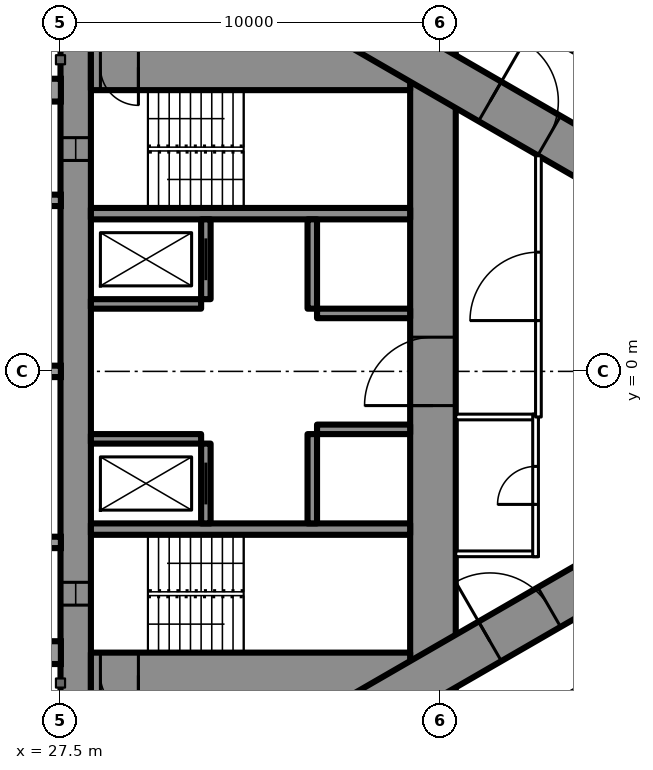
"""IFC4 building model, lengths in metres.
Left out: names, types, materials, properties, quantities, classifications, styles, units other than length and angle.
Written with IfcOpenShell. Run it as: python <this file> out.ifc"""

import sys

from ifc_helpers import new_model, si_unit, direction, frame, frame_2d, origin, place, context, subcontext, project, spatial, rectangle, extrude, element, fill, save


model = new_model("IFC4")
c1 = context("Model", 3, precision=1e-05, world=origin(), true_north=direction((0.0, 1.0)))
c2 = subcontext(c1, "Body", "Model", "MODEL_VIEW")
j1 = project(units=[si_unit("LENGTHUNIT", "METRE"), si_unit("PLANEANGLEUNIT", "RADIAN")], contexts=[c1])
p1 = place(None, origin())
s1 = spatial("IfcSite", under=j1, at=p1, CompositionType="ELEMENT")
p2 = place(p1, origin())
s2 = spatial("IfcBuilding", under=s1, at=p2, CompositionType="ELEMENT")
p3 = place(p2, frame((0.0, 0.0, 42.5)))
s3 = spatial("IfcBuildingStorey", under=s2, at=p3, CompositionType="ELEMENT", Elevation=42.5)
p4 = place(p3, frame((27.9, -8.6, 0.0), z_axis=(0.0, 0.0, 1.0), x_axis=(0.0, 1.0, 0.0)))
e1 = element("IfcWall", 1, at=p4, inside=s3, PredefinedType="SHEAR", context=c2, shape_type="SweptSolid", body=[
    extrude(rectangle(XDim=17.2, YDim=0.8, at=frame_2d((8.6, 0.0))), origin(), (0.0, 0.0, 1.0), 3.5),
])
p5 = place(p4, frame((2.45, 0.0, 0.6)))
e2 = element("IfcOpeningElement", 2, at=p5, cuts=e1, PredefinedType="OPENING", context=c2, shape_type="SweptSolid", body=[
    extrude(rectangle(XDim=0.6, YDim=2.1, at=frame_2d((0.3, 1.05))), frame((0.0, 0.41, 0.0), z_axis=(0.0, -1.0, 0.0), x_axis=(1.0, 0.0, 0.0)), (0.0, 0.0, 1.0), 0.82),
])
p6 = place(p4, frame((14.15, 0.0, 0.6)))
e3 = element("IfcOpeningElement", 3, at=p6, cuts=e1, PredefinedType="OPENING", context=c2, shape_type="SweptSolid", body=[
    extrude(rectangle(XDim=0.6, YDim=2.1, at=frame_2d((0.3, 1.05))), frame((0.0, 0.41, 0.0), z_axis=(0.0, -1.0, 0.0), x_axis=(1.0, 0.0, 0.0)), (0.0, 0.0, 1.0), 0.82),
])
p7 = place(p3, frame((37.3, -8.6, 0.0), z_axis=(0.0, 0.0, 1.0), x_axis=(0.0, 1.0, 0.0)))
e4 = element("IfcWall", 4, at=p7, inside=s3, PredefinedType="SHEAR", context=c2, shape_type="SweptSolid", body=[
    extrude(rectangle(XDim=17.2, YDim=1.2, at=frame_2d((8.6, 0.0))), origin(), (0.0, 0.0, 1.0), 3.5),
])
p8 = place(p7, frame((7.7, 0.0, 0.0)))
e5 = element("IfcOpeningElement", 5, at=p8, cuts=e4, PredefinedType="OPENING", context=c2, shape_type="SweptSolid", body=[
    extrude(rectangle(XDim=1.8, YDim=2.2, at=frame_2d((0.9, 1.1))), frame((0.0, 0.61, 0.0), z_axis=(0.0, -1.0, 0.0), x_axis=(1.0, 0.0, 0.0)), (0.0, 0.0, 1.0), 1.22),
])
p9 = place(p3, frame((28.3, -8.0, 0.0), z_axis=(0.0, 0.0, 1.0), x_axis=(1.0, 0.0, 0.0)))
e6 = element("IfcWall", 6, at=p9, inside=s3, PredefinedType="SHEAR", context=c2, shape_type="SweptSolid", body=[
    extrude(rectangle(XDim=8.4, YDim=1.2, at=frame_2d((4.2, 0.0))), origin(), (0.0, 0.0, 1.0), 3.5),
])
p10 = place(p9, frame((0.25, 0.0, 0.0)))
e7 = element("IfcOpeningElement", 7, at=p10, cuts=e6, PredefinedType="OPENING", context=c2, shape_type="SweptSolid", body=[
    extrude(rectangle(XDim=1.0, YDim=2.2, at=frame_2d((0.5, 1.1))), frame((0.0, 0.61, 0.0), z_axis=(0.0, -1.0, 0.0), x_axis=(1.0, 0.0, 0.0)), (0.0, 0.0, 1.0), 1.22),
])
p11 = place(p3, frame((28.3, 8.0, 0.0), z_axis=(0.0, 0.0, 1.0), x_axis=(1.0, 0.0, 0.0)))
e8 = element("IfcWall", 8, at=p11, inside=s3, PredefinedType="SHEAR", context=c2, shape_type="SweptSolid", body=[
    extrude(rectangle(XDim=8.4, YDim=1.2, at=frame_2d((4.2, 0.0))), origin(), (0.0, 0.0, 1.0), 3.5),
])
p12 = place(p11, frame((0.25, 0.0, 0.0)))
e9 = element("IfcOpeningElement", 9, at=p12, cuts=e8, PredefinedType="OPENING", context=c2, shape_type="SweptSolid", body=[
    extrude(rectangle(XDim=1.0, YDim=2.2, at=frame_2d((0.5, 1.1))), frame((0.0, 0.61, 0.0), z_axis=(0.0, -1.0, 0.0), x_axis=(1.0, 0.0, 0.0)), (0.0, 0.0, 1.0), 1.22),
])
for number, where, z_axis, x_axis in (
    (10, (28.3, -4.15, 0.0), (0.0, 0.0, 1.0), (1.0, 0.0, 0.0)),
    (11, (28.3, 4.15, 0.0), (0.0, 0.0, 1.0), (1.0, 0.0, 0.0)),
):
    element("IfcWall", number, at=place(p3, frame(where, z_axis=z_axis, x_axis=x_axis)), inside=s3, PredefinedType="SHEAR", context=c2, shape_type="SweptSolid", body=[
        extrude(rectangle(XDim=8.4, YDim=0.3, at=frame_2d((4.2, 0.0))), origin(), (0.0, 0.0, 1.0), 3.5),
    ])
p13 = place(p3, frame((31.325, -4.0, 0.0), z_axis=(0.0, 0.0, 1.0), x_axis=(0.0, 1.0, 0.0)))
e12 = element("IfcWall", 12, at=p13, inside=s3, PredefinedType="SHEAR", context=c2, shape_type="SweptSolid", body=[
    extrude(rectangle(XDim=2.1, YDim=0.25, at=frame_2d((1.05, 0.0))), origin(), (0.0, 0.0, 1.0), 3.5),
])
p14 = place(p13, frame((0.5, 0.0, 0.0)))
e13 = element("IfcOpeningElement", 13, at=p14, cuts=e12, PredefinedType="OPENING", context=c2, shape_type="SweptSolid", body=[
    extrude(rectangle(XDim=1.1, YDim=2.2, at=frame_2d((0.55, 1.1))), frame((0.0, 0.135, 0.0), z_axis=(0.0, -1.0, 0.0), x_axis=(1.0, 0.0, 0.0)), (0.0, 0.0, 1.0), 0.27),
])
p15 = place(p3, frame((34.125, -4.0, 0.0), z_axis=(0.0, 0.0, 1.0), x_axis=(0.0, 1.0, 0.0)))
e14 = element("IfcWall", 14, at=p15, inside=s3, PredefinedType="SHEAR", context=c2, shape_type="SweptSolid", body=[
    extrude(rectangle(XDim=2.35, YDim=0.25, at=frame_2d((1.175, 0.0))), origin(), (0.0, 0.0, 1.0), 3.5),
])
p16 = place(p3, frame((28.3, -1.775, 0.0), z_axis=(0.0, 0.0, 1.0), x_axis=(1.0, 0.0, 0.0)))
e15 = element("IfcWall", 15, at=p16, inside=s3, PredefinedType="SHEAR", context=c2, shape_type="SweptSolid", body=[
    extrude(rectangle(XDim=2.9, YDim=0.25, at=frame_2d((1.45, 0.0))), origin(), (0.0, 0.0, 1.0), 3.5),
])
p17 = place(p3, frame((34.25, -1.525, 0.0), z_axis=(0.0, 0.0, 1.0), x_axis=(1.0, 0.0, 0.0)))
e16 = element("IfcWall", 16, at=p17, inside=s3, PredefinedType="SHEAR", context=c2, shape_type="SweptSolid", body=[
    extrude(rectangle(XDim=2.45, YDim=0.25, at=frame_2d((1.225, 0.0))), origin(), (0.0, 0.0, 1.0), 3.5),
])
p18 = place(p3, frame((31.325, 1.9, 0.0), z_axis=(0.0, 0.0, 1.0), x_axis=(0.0, 1.0, 0.0)))
e17 = element("IfcWall", 17, at=p18, inside=s3, PredefinedType="SHEAR", context=c2, shape_type="SweptSolid", body=[
    extrude(rectangle(XDim=2.1, YDim=0.25, at=frame_2d((1.05, 0.0))), origin(), (0.0, 0.0, 1.0), 3.5),
])
p19 = place(p18, frame((0.5, 0.0, 0.0)))
e18 = element("IfcOpeningElement", 18, at=p19, cuts=e17, PredefinedType="OPENING", context=c2, shape_type="SweptSolid", body=[
    extrude(rectangle(XDim=1.1, YDim=2.2, at=frame_2d((0.55, 1.1))), frame((0.0, 0.135, 0.0), z_axis=(0.0, -1.0, 0.0), x_axis=(1.0, 0.0, 0.0)), (0.0, 0.0, 1.0), 0.27),
])
p20 = place(p3, frame((34.125, 1.65, 0.0), z_axis=(0.0, 0.0, 1.0), x_axis=(0.0, 1.0, 0.0)))
e19 = element("IfcWall", 19, at=p20, inside=s3, PredefinedType="SHEAR", context=c2, shape_type="SweptSolid", body=[
    extrude(rectangle(XDim=2.35, YDim=0.25, at=frame_2d((1.175, 0.0))), origin(), (0.0, 0.0, 1.0), 3.5),
])
p21 = place(p3, frame((28.3, 1.775, 0.0), z_axis=(0.0, 0.0, 1.0), x_axis=(1.0, 0.0, 0.0)))
e20 = element("IfcWall", 20, at=p21, inside=s3, PredefinedType="SHEAR", context=c2, shape_type="SweptSolid", body=[
    extrude(rectangle(XDim=2.9, YDim=0.25, at=frame_2d((1.45, 0.0))), origin(), (0.0, 0.0, 1.0), 3.5),
])
p22 = place(p3, frame((34.25, 1.525, 0.0), z_axis=(0.0, 0.0, 1.0), x_axis=(1.0, 0.0, 0.0)))
e21 = element("IfcWall", 21, at=p22, inside=s3, PredefinedType="SHEAR", context=c2, shape_type="SweptSolid", body=[
    extrude(rectangle(XDim=2.45, YDim=0.25, at=frame_2d((1.225, 0.0))), origin(), (0.0, 0.0, 1.0), 3.5),
])
p23 = place(p3, frame((27.2, -13.8, 0.0), z_axis=(0.0, 0.0, 1.0), x_axis=(0.866027159892, 0.499996958321, 0.0)))
e22 = element("IfcWall", 22, at=p23, inside=s3, PredefinedType="SHEAR", context=c2, shape_type="SweptSolid", body=[
    extrude(rectangle(XDim=27.947, YDim=1.2, at=frame_2d((13.973, 0.0))), origin(), (0.0, 0.0, 1.0), 3.5),
])
p24 = place(p23, frame((4.6, 0.0, 0.0)))
e23 = element("IfcOpeningElement", 23, at=p24, cuts=e22, PredefinedType="OPENING", context=c2, shape_type="SweptSolid", body=[
    extrude(rectangle(XDim=1.0, YDim=2.2, at=frame_2d((0.5, 1.1))), frame((0.0, 0.61, 0.0), z_axis=(0.0, -1.0, 0.0), x_axis=(1.0, 0.0, 0.0)), (0.0, 0.0, 1.0), 1.22),
])
p25 = place(p23, frame((13.395, 0.0, 0.0)))
e24 = element("IfcOpeningElement", 24, at=p25, cuts=e22, PredefinedType="OPENING", context=c2, shape_type="SweptSolid", body=[
    extrude(rectangle(XDim=1.8, YDim=2.2, at=frame_2d((0.9, 1.1))), frame((0.0, 0.61, 0.0), z_axis=(0.0, -1.0, 0.0), x_axis=(1.0, 0.0, 0.0)), (0.0, 0.0, 1.0), 1.22),
])
p26 = place(p3, frame((27.2, 13.8, 0.0), z_axis=(0.0, 0.0, 1.0), x_axis=(0.866024515034, -0.500001539357, 0.0)))
e25 = element("IfcWall", 25, at=p26, inside=s3, PredefinedType="SHEAR", context=c2, shape_type="SweptSolid", body=[
    extrude(rectangle(XDim=26.907, YDim=1.2, at=frame_2d((13.454, 0.0))), origin(), (0.0, 0.0, 1.0), 3.5),
])
p27 = place(p26, frame((4.6, 0.0, 0.0)))
e26 = element("IfcOpeningElement", 26, at=p27, cuts=e25, PredefinedType="OPENING", context=c2, shape_type="SweptSolid", body=[
    extrude(rectangle(XDim=1.0, YDim=2.2, at=frame_2d((0.5, 1.1))), frame((0.0, 0.61, 0.0), z_axis=(0.0, -1.0, 0.0), x_axis=(1.0, 0.0, 0.0)), (0.0, 0.0, 1.0), 1.22),
])
p28 = place(p26, frame((13.395, 0.0, 0.0)))
e27 = element("IfcOpeningElement", 27, at=p28, cuts=e25, PredefinedType="OPENING", context=c2, shape_type="SweptSolid", body=[
    extrude(rectangle(XDim=1.8, YDim=2.2, at=frame_2d((0.9, 1.1))), frame((0.0, 0.61, 0.0), z_axis=(0.0, -1.0, 0.0), x_axis=(1.0, 0.0, 0.0)), (0.0, 0.0, 1.0), 1.22),
])
p29 = place(p3, frame((37.96, -10.243, 0.0), z_axis=(0.0, 0.0, 1.0), x_axis=(0.866026429433, 0.499998223521, 0.0)))
e28 = element("IfcWall", 28, at=p29, inside=s3, PredefinedType="PARTITIONING", context=c2, shape_type="SweptSolid", body=[
    extrude(rectangle(XDim=20.487, YDim=0.2, at=frame_2d((10.243, 0.0))), origin(), (0.0, 0.0, 1.0), 3.25),
])
p30 = place(p29, frame((7.325, 0.0, 0.0)))
e29 = element("IfcOpeningElement", 29, at=p30, cuts=e28, PredefinedType="OPENING", context=c2, shape_type="SweptSolid", body=[
    extrude(rectangle(XDim=1.0, YDim=2.2, at=frame_2d((0.5, 1.1))), frame((0.0, 0.11, 0.0), z_axis=(0.0, -1.0, 0.0), x_axis=(1.0, 0.0, 0.0)), (0.0, 0.0, 1.0), 0.22),
])
p31 = place(p29, frame((18.937, 0.0, 0.0)))
e30 = element("IfcOpeningElement", 30, at=p31, cuts=e28, PredefinedType="OPENING", context=c2, shape_type="SweptSolid", body=[
    extrude(rectangle(XDim=0.95, YDim=2.2, at=frame_2d((0.475, 1.1))), frame((0.0, 0.11, 0.0), z_axis=(0.0, -1.0, 0.0), x_axis=(1.0, 0.0, 0.0)), (0.0, 0.0, 1.0), 0.22),
])
p32 = place(p29, frame((0.6, 0.0, 0.0)))
e31 = element("IfcOpeningElement", 31, at=p32, cuts=e28, PredefinedType="OPENING", context=c2, shape_type="SweptSolid", body=[
    extrude(rectangle(XDim=0.95, YDim=2.2, at=frame_2d((0.475, 1.1))), frame((0.0, 0.11, 0.0), z_axis=(0.0, -1.0, 0.0), x_axis=(1.0, 0.0, 0.0)), (0.0, 0.0, 1.0), 0.22),
])
p33 = place(p3, frame((36.834, 10.894, 0.0), z_axis=(0.0, 0.0, 1.0), x_axis=(0.866028157229, -0.499995230863, 0.0)))
e32 = element("IfcWall", 32, at=p33, inside=s3, PredefinedType="PARTITIONING", context=c2, shape_type="SweptSolid", body=[
    extrude(rectangle(XDim=21.667, YDim=0.2, at=frame_2d((10.833, 0.0))), origin(), (0.0, 0.0, 1.0), 3.25),
])
p34 = place(p33, frame((18.885, 0.0, 0.0)))
e33 = element("IfcOpeningElement", 33, at=p34, cuts=e32, PredefinedType="OPENING", context=c2, shape_type="SweptSolid", body=[
    extrude(rectangle(XDim=0.95, YDim=2.2, at=frame_2d((0.475, 1.1))), frame((0.0, 0.11, 0.0), z_axis=(0.0, -1.0, 0.0), x_axis=(1.0, 0.0, 0.0)), (0.0, 0.0, 1.0), 0.22),
])
p35 = place(p33, frame((10.212, 0.0, 0.0)))
e34 = element("IfcOpeningElement", 34, at=p35, cuts=e32, PredefinedType="OPENING", context=c2, shape_type="SweptSolid", body=[
    extrude(rectangle(XDim=0.95, YDim=2.2, at=frame_2d((0.475, 1.1))), frame((0.0, 0.11, 0.0), z_axis=(0.0, -1.0, 0.0), x_axis=(1.0, 0.0, 0.0)), (0.0, 0.0, 1.0), 0.22),
])
p36 = place(p33, frame((8.225, 0.0, 0.0)))
e35 = element("IfcOpeningElement", 35, at=p36, cuts=e32, PredefinedType="OPENING", context=c2, shape_type="SweptSolid", body=[
    extrude(rectangle(XDim=0.95, YDim=2.2, at=frame_2d((0.475, 1.1))), frame((0.0, 0.11, 0.0), z_axis=(0.0, -1.0, 0.0), x_axis=(1.0, 0.0, 0.0)), (0.0, 0.0, 1.0), 0.22),
])
p37 = place(p33, frame((1.825, 0.0, 0.0)))
e36 = element("IfcOpeningElement", 36, at=p37, cuts=e32, PredefinedType="OPENING", context=c2, shape_type="SweptSolid", body=[
    extrude(rectangle(XDim=0.95, YDim=2.2, at=frame_2d((0.475, 1.1))), frame((0.0, 0.11, 0.0), z_axis=(0.0, -1.0, 0.0), x_axis=(1.0, 0.0, 0.0)), (0.0, 0.0, 1.0), 0.22),
])
p38 = place(p33, frame((0.246, 0.0, 0.0)))
e37 = element("IfcOpeningElement", 37, at=p38, cuts=e32, PredefinedType="OPENING", context=c2, shape_type="SweptSolid", body=[
    extrude(rectangle(XDim=0.9, YDim=2.2, at=frame_2d((0.45, 1.1))), frame((0.0, 0.11, 0.0), z_axis=(0.0, -1.0, 0.0), x_axis=(1.0, 0.0, 0.0)), (0.0, 0.0, 1.0), 0.22),
])
for number, where, z_axis, x_axis in (
    (38, (37.9, -1.2, 0.0), (0.0, 0.0, 1.0), (1.0, 0.0, 0.0)),
    (39, (37.9, -4.8, 0.0), (0.0, 0.0, 1.0), (1.0, 0.0, 0.0)),
):
    element("IfcWall", number, at=place(p3, frame(where, z_axis=z_axis, x_axis=x_axis)), inside=s3, PredefinedType="PARTITIONING", context=c2, shape_type="SweptSolid", body=[
        extrude(rectangle(XDim=2.175, YDim=0.15, at=frame_2d((1.087, 0.0))), origin(), (0.0, 0.0, 1.0), 3.25),
    ])
p39 = place(p3, frame((40.0, -4.875, 0.0), z_axis=(0.0, 0.0, 1.0), x_axis=(0.0, 1.0, 0.0)))
e40 = element("IfcWall", 40, at=p39, inside=s3, PredefinedType="PARTITIONING", context=c2, shape_type="SweptSolid", body=[
    extrude(rectangle(XDim=3.75, YDim=0.15, at=frame_2d((1.875, 0.0))), origin(), (0.0, 0.0, 1.0), 3.25),
])
p40 = place(p39, frame((1.375, 0.0, 0.0)))
e41 = element("IfcOpeningElement", 41, at=p40, cuts=e40, PredefinedType="OPENING", context=c2, shape_type="SweptSolid", body=[
    extrude(rectangle(XDim=1.0, YDim=2.2, at=frame_2d((0.5, 1.1))), frame((0.0, 0.085, 0.0), z_axis=(0.0, -1.0, 0.0), x_axis=(1.0, 0.0, 0.0)), (0.0, 0.0, 1.0), 0.17),
])
p41 = place(p3, frame((40.075, -1.2, 0.0), z_axis=(0.0, 0.0, 1.0), x_axis=(0.0, 1.0, 0.0)))
e42 = element("IfcWall", 42, at=p41, inside=s3, PredefinedType="PARTITIONING", context=c2, shape_type="SweptSolid", body=[
    extrude(rectangle(XDim=6.874, YDim=0.15, at=frame_2d((3.437, 0.0))), origin(), (0.0, 0.0, 1.0), 3.25),
])
p42 = place(p41, frame((2.537, 0.0, 0.0)))
e43 = element("IfcOpeningElement", 43, at=p42, cuts=e42, PredefinedType="OPENING", context=c2, shape_type="SweptSolid", body=[
    extrude(rectangle(XDim=1.8, YDim=2.2, at=frame_2d((0.9, 1.1))), frame((0.0, 0.085, 0.0), z_axis=(0.0, -1.0, 0.0), x_axis=(1.0, 0.0, 0.0)), (0.0, 0.0, 1.0), 0.17),
])
p43 = place(p40, origin())
e44 = element("IfcDoor", 44, at=p43, inside=s3, OperationType="SINGLE_SWING_LEFT", PredefinedType="DOOR", context=c2, shape_type="SweptSolid", body=[
    extrude(rectangle(XDim=1.0, YDim=2.2, at=frame_2d((0.5, 1.1))), frame((0.0, 0.025, 0.0), z_axis=(0.0, -1.0, 0.0), x_axis=(1.0, 0.0, 0.0)), (0.0, 0.0, 1.0), 0.05),
])
fill(e41, e44)
p44 = place(p42, origin())
e45 = element("IfcDoor", 45, at=p44, inside=s3, OperationType="DOUBLE_DOOR_SINGLE_SWING", PredefinedType="DOOR", context=c2, shape_type="SweptSolid", body=[
    extrude(rectangle(XDim=1.8, YDim=2.2, at=frame_2d((0.9, 1.1))), frame((0.0, 0.025, 0.0), z_axis=(0.0, -1.0, 0.0), x_axis=(1.0, 0.0, 0.0)), (0.0, 0.0, 1.0), 0.05),
])
fill(e43, e45)
p45 = place(p25, origin())
e46 = element("IfcDoor", 46, at=p45, inside=s3, OperationType="DOUBLE_DOOR_SINGLE_SWING", PredefinedType="DOOR", context=c2, shape_type="SweptSolid", body=[
    extrude(rectangle(XDim=1.8, YDim=2.2, at=frame_2d((0.9, 1.1))), frame((0.0, 0.025, 0.0), z_axis=(0.0, -1.0, 0.0), x_axis=(1.0, 0.0, 0.0)), (0.0, 0.0, 1.0), 0.05),
])
fill(e24, e46)
p46 = place(p28, origin())
e47 = element("IfcDoor", 47, at=p46, inside=s3, OperationType="DOUBLE_DOOR_SINGLE_SWING", PredefinedType="DOOR", context=c2, shape_type="SweptSolid", body=[
    extrude(rectangle(XDim=1.8, YDim=2.2, at=frame_2d((0.9, 1.1))), frame((0.0, 0.025, 0.0), z_axis=(0.0, -1.0, 0.0), x_axis=(1.0, 0.0, 0.0)), (0.0, 0.0, 1.0), 0.05),
])
fill(e27, e47)
p47 = place(p8, origin())
e48 = element("IfcDoor", 48, at=p47, inside=s3, OperationType="DOUBLE_DOOR_SINGLE_SWING", PredefinedType="DOOR", context=c2, shape_type="SweptSolid", body=[
    extrude(rectangle(XDim=1.8, YDim=2.2, at=frame_2d((0.9, 1.1))), frame((0.0, 0.025, 0.0), z_axis=(0.0, -1.0, 0.0), x_axis=(1.0, 0.0, 0.0)), (0.0, 0.0, 1.0), 0.05),
])
fill(e5, e48)
p48 = place(p10, origin())
e49 = element("IfcDoor", 49, at=p48, inside=s3, OperationType="SINGLE_SWING_RIGHT", PredefinedType="DOOR", context=c2, shape_type="SweptSolid", body=[
    extrude(rectangle(XDim=1.0, YDim=2.2, at=frame_2d((0.5, 1.1))), frame((0.0, 0.025, 0.0), z_axis=(0.0, -1.0, 0.0), x_axis=(1.0, 0.0, 0.0)), (0.0, 0.0, 1.0), 0.05),
])
fill(e7, e49)
p49 = place(p12, origin())
e50 = element("IfcDoor", 50, at=p49, inside=s3, OperationType="SINGLE_SWING_RIGHT", PredefinedType="DOOR", context=c2, shape_type="SweptSolid", body=[
    extrude(rectangle(XDim=1.0, YDim=2.2, at=frame_2d((0.5, 1.1))), frame((0.0, 0.025, 0.0), z_axis=(0.0, -1.0, 0.0), x_axis=(1.0, 0.0, 0.0)), (0.0, 0.0, 1.0), 0.05),
])
fill(e9, e50)
p50 = place(p14, origin())
e51 = element("IfcDoor", 51, at=p50, inside=s3, OperationType="SLIDING_TO_LEFT", PredefinedType="USERDEFINED", context=c2, shape_type="SweptSolid", body=[
    extrude(rectangle(XDim=1.1, YDim=2.2, at=frame_2d((0.55, 1.1))), frame((0.0, 0.025, 0.0), z_axis=(0.0, -1.0, 0.0), x_axis=(1.0, 0.0, 0.0)), (0.0, 0.0, 1.0), 0.05),
])
fill(e13, e51)
p51 = place(p19, origin())
e52 = element("IfcDoor", 52, at=p51, inside=s3, OperationType="SLIDING_TO_LEFT", PredefinedType="USERDEFINED", context=c2, shape_type="SweptSolid", body=[
    extrude(rectangle(XDim=1.1, YDim=2.2, at=frame_2d((0.55, 1.1))), frame((0.0, 0.025, 0.0), z_axis=(0.0, -1.0, 0.0), x_axis=(1.0, 0.0, 0.0)), (0.0, 0.0, 1.0), 0.05),
])
fill(e18, e52)
p52 = place(p5, origin())
e53 = element("IfcWindow", 53, at=p52, inside=s3, PartitioningType="SINGLE_PANEL", PredefinedType="WINDOW", context=c2, shape_type="SweptSolid", body=[
    extrude(rectangle(XDim=0.6, YDim=2.1, at=frame_2d((0.3, 1.05))), frame((0.0, 0.03, 0.0), z_axis=(0.0, -1.0, 0.0), x_axis=(1.0, 0.0, 0.0)), (0.0, 0.0, 1.0), 0.06),
])
fill(e2, e53)
p53 = place(p6, origin())
e54 = element("IfcWindow", 54, at=p53, inside=s3, PartitioningType="SINGLE_PANEL", PredefinedType="WINDOW", context=c2, shape_type="SweptSolid", body=[
    extrude(rectangle(XDim=0.6, YDim=2.1, at=frame_2d((0.3, 1.05))), frame((0.0, 0.03, 0.0), z_axis=(0.0, -1.0, 0.0), x_axis=(1.0, 0.0, 0.0)), (0.0, 0.0, 1.0), 0.06),
])
fill(e3, e54)
save(model, sys.argv[1])
